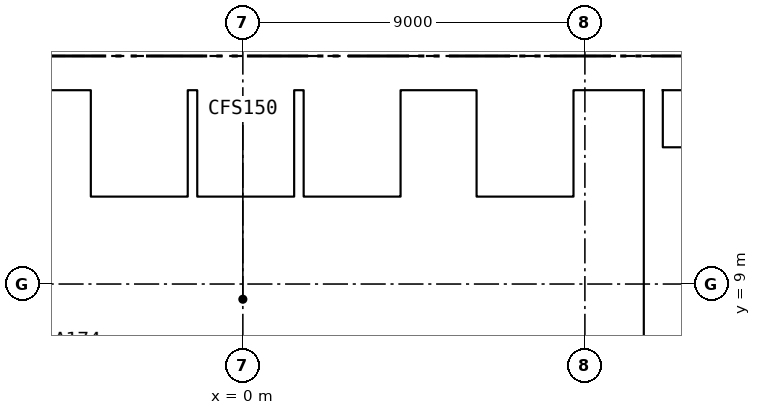
"""IFC4 building model, lengths in metres.
Left out: names, types, materials, properties, quantities, classifications, styles, units other than length and angle.
Written with IfcOpenShell. Run it as: python <this file> out.ifc"""

import sys

from ifc_helpers import new_model, si_unit, direction, frame, frame_2d, origin, place, context, subcontext, project, spatial, rectangle, extrude, element, fill, save


model = new_model("IFC4")
c1 = context("Model", 3, precision=1e-05, world=origin(), true_north=direction((0.0, 1.0)))
c2 = subcontext(c1, "Body", "Model", "MODEL_VIEW")
j1 = project(units=[si_unit("LENGTHUNIT", "METRE"), si_unit("PLANEANGLEUNIT", "RADIAN")], contexts=[c1])
p1 = place(None, origin())
s1 = spatial("IfcSite", under=j1, at=p1, CompositionType="ELEMENT")
p2 = place(p1, origin())
s2 = spatial("IfcBuilding", under=s1, at=p2, CompositionType="ELEMENT")
p3 = place(p2, frame((0.0, 0.0, 80.65)))
s3 = spatial("IfcBuildingStorey", under=s2, at=p3, CompositionType="ELEMENT", Elevation=80.65)
p4 = place(p3, frame((-15.0, 14.55, -0.15), z_axis=(0.0, 0.0, 1.0), x_axis=(1.0, 0.0, 0.0)))
e1 = element("IfcWall", 1, at=p4, inside=s3, PredefinedType="SOLIDWALL", context=c2, shape_type="SweptSolid", body=[
    extrude(rectangle(XDim=30.0, YDim=0.9, at=frame_2d((15.0, 0.0))), origin(), (0.0, 0.0, 1.0), 3.65),
])
p5 = place(p4, frame((9.25, 0.0, 0.15)))
e2 = element("IfcOpeningElement", 2, at=p5, cuts=e1, PredefinedType="OPENING", context=c2, shape_type="SweptSolid", body=[
    extrude(rectangle(XDim=1.5, YDim=2.1, at=frame_2d((0.75, 1.05))), frame((0.0, 0.46, 0.0), z_axis=(0.0, -1.0, 0.0), x_axis=(1.0, 0.0, 0.0)), (0.0, 0.0, 1.0), 0.92),
])
p6 = place(p4, frame((19.4, 0.0, 0.15)))
e3 = element("IfcOpeningElement", 3, at=p6, cuts=e1, PredefinedType="OPENING", context=c2, shape_type="SweptSolid", body=[
    extrude(rectangle(XDim=1.5, YDim=2.1, at=frame_2d((0.75, 1.05))), frame((0.0, 0.46, 0.0), z_axis=(0.0, -1.0, 0.0), x_axis=(1.0, 0.0, 0.0)), (0.0, 0.0, 1.0), 0.92),
])
p7 = place(p4, frame((1.5, 0.0, 0.15)))
e4 = element("IfcOpeningElement", 4, at=p7, cuts=e1, PredefinedType="OPENING", context=c2, shape_type="SweptSolid", body=[
    extrude(rectangle(XDim=1.2, YDim=2.1, at=frame_2d((0.6, 1.05))), frame((0.0, 0.46, 0.0), z_axis=(0.0, -1.0, 0.0), x_axis=(1.0, 0.0, 0.0)), (0.0, 0.0, 1.0), 0.92),
])
p8 = place(p4, frame((27.3, 0.0, 0.15)))
e5 = element("IfcOpeningElement", 5, at=p8, cuts=e1, PredefinedType="OPENING", context=c2, shape_type="SweptSolid", body=[
    extrude(rectangle(XDim=1.2, YDim=2.1, at=frame_2d((0.6, 1.05))), frame((0.0, 0.46, 0.0), z_axis=(0.0, -1.0, 0.0), x_axis=(1.0, 0.0, 0.0)), (0.0, 0.0, 1.0), 0.92),
])
p9 = place(p3, frame((10.8, 0.9, -0.15), z_axis=(0.0, 0.0, 1.0), x_axis=(0.0, 1.0, 0.0)))
e6 = element("IfcWall", 6, at=p9, inside=s3, PredefinedType="SOLIDWALL", context=c2, shape_type="SweptSolid", body=[
    extrude(rectangle(XDim=13.2, YDim=0.5, at=frame_2d((6.6, 0.0))), origin(), (0.0, 0.0, 1.0), 3.65),
])
p10 = place(p3, frame((-4.125, 8.55, 0.0), z_axis=(0.0, 0.0, 1.0), x_axis=(1.0, 0.0, 0.0)))
e7 = element("IfcWall", 7, at=p10, inside=s3, PredefinedType="PARTITIONING", context=c2, shape_type="SweptSolid", body=[
    extrude(rectangle(XDim=14.675, YDim=0.2, at=frame_2d((7.337, 0.0))), origin(), (0.0, 0.0, 1.0), 3.5),
])
p11 = place(p10, frame((1.413, 0.0, 0.0)))
e8 = element("IfcOpeningElement", 8, at=p11, cuts=e7, PredefinedType="OPENING", context=c2, shape_type="SweptSolid", body=[
    extrude(rectangle(XDim=1.0, YDim=2.1, at=frame_2d((0.5, 1.05))), frame((0.0, 0.11, 0.0), z_axis=(0.0, -1.0, 0.0), x_axis=(1.0, 0.0, 0.0)), (0.0, 0.0, 1.0), 0.22),
])
p12 = place(p10, frame((5.0, 0.0, 0.0)))
e9 = element("IfcOpeningElement", 9, at=p12, cuts=e7, PredefinedType="OPENING", context=c2, shape_type="SweptSolid", body=[
    extrude(rectangle(XDim=1.0, YDim=2.1, at=frame_2d((0.5, 1.05))), frame((0.0, 0.11, 0.0), z_axis=(0.0, -1.0, 0.0), x_axis=(1.0, 0.0, 0.0)), (0.0, 0.0, 1.0), 0.22),
])
p13 = place(p10, frame((9.613, 0.0, 0.0)))
e10 = element("IfcOpeningElement", 10, at=p13, cuts=e7, PredefinedType="OPENING", context=c2, shape_type="SweptSolid", body=[
    extrude(rectangle(XDim=1.0, YDim=2.1, at=frame_2d((0.5, 1.05))), frame((0.0, 0.11, 0.0), z_axis=(0.0, -1.0, 0.0), x_axis=(1.0, 0.0, 0.0)), (0.0, 0.0, 1.0), 0.22),
])
p14 = place(p10, frame((13.475, 0.0, 0.0)))
e11 = element("IfcOpeningElement", 11, at=p14, cuts=e7, PredefinedType="OPENING", context=c2, shape_type="SweptSolid", body=[
    extrude(rectangle(XDim=0.9, YDim=2.1, at=frame_2d((0.45, 1.05))), frame((0.0, 0.11, 0.0), z_axis=(0.0, -1.0, 0.0), x_axis=(1.0, 0.0, 0.0)), (0.0, 0.0, 1.0), 0.22),
])
p15 = place(p3, frame((-4.25, 11.2, 0.0), z_axis=(0.0, 0.0, 1.0), x_axis=(1.0, 0.0, 0.0)))
e12 = element("IfcWall", 12, at=p15, inside=s3, PredefinedType="PARTITIONING", context=c2, shape_type="SweptSolid", body=[
    extrude(rectangle(XDim=8.65, YDim=0.2, at=frame_2d((4.325, 0.0))), origin(), (0.0, 0.0, 1.0), 3.5),
])
p16 = place(p15, frame((0.825, 0.0, 0.0)))
e13 = element("IfcOpeningElement", 13, at=p16, cuts=e12, PredefinedType="OPENING", context=c2, shape_type="SweptSolid", body=[
    extrude(rectangle(XDim=1.4, YDim=2.1, at=frame_2d((0.7, 1.05))), frame((0.0, 0.11, 0.0), z_axis=(0.0, -1.0, 0.0), x_axis=(1.0, 0.0, 0.0)), (0.0, 0.0, 1.0), 0.22),
])
p17 = place(p15, frame((3.625, 0.0, 0.0)))
e14 = element("IfcOpeningElement", 14, at=p17, cuts=e12, PredefinedType="OPENING", context=c2, shape_type="SweptSolid", body=[
    extrude(rectangle(XDim=1.4, YDim=2.1, at=frame_2d((0.7, 1.05))), frame((0.0, 0.11, 0.0), z_axis=(0.0, -1.0, 0.0), x_axis=(1.0, 0.0, 0.0)), (0.0, 0.0, 1.0), 0.22),
])
p18 = place(p3, frame((5.9, 11.2, 0.0), z_axis=(0.0, 0.0, 1.0), x_axis=(1.0, 0.0, 0.0)))
e15 = element("IfcWall", 15, at=p18, inside=s3, PredefinedType="PARTITIONING", context=c2, shape_type="SweptSolid", body=[
    extrude(rectangle(XDim=4.65, YDim=0.2, at=frame_2d((2.325, 0.0))), origin(), (0.0, 0.0, 1.0), 3.5),
])
p19 = place(p18, frame((3.4, 0.0, 0.0)))
e16 = element("IfcOpeningElement", 16, at=p19, cuts=e15, PredefinedType="OPENING", context=c2, shape_type="SweptSolid", body=[
    extrude(rectangle(XDim=0.9, YDim=2.1, at=frame_2d((0.45, 1.05))), frame((0.0, 0.11, 0.0), z_axis=(0.0, -1.0, 0.0), x_axis=(1.0, 0.0, 0.0)), (0.0, 0.0, 1.0), 0.22),
])
p20 = place(p3, frame((-4.125, 6.15, 0.0), z_axis=(0.0, 0.0, 1.0), x_axis=(0.0, 1.0, 0.0)))
e17 = element("IfcWall", 17, at=p20, inside=s3, PredefinedType="PARTITIONING", context=c2, shape_type="SweptSolid", body=[
    extrude(rectangle(XDim=4.95, YDim=0.25, at=frame_2d((2.475, 0.0))), origin(), (0.0, 0.0, 1.0), 3.5),
])
p21 = place(p20, frame((3.125, 0.0, 0.0)))
e18 = element("IfcOpeningElement", 18, at=p21, cuts=e17, PredefinedType="OPENING", context=c2, shape_type="SweptSolid", body=[
    extrude(rectangle(XDim=1.2, YDim=2.1, at=frame_2d((0.6, 1.05))), frame((0.0, 0.135, 0.0), z_axis=(0.0, -1.0, 0.0), x_axis=(1.0, 0.0, 0.0)), (0.0, 0.0, 1.0), 0.27),
])
for number, where, z_axis, x_axis in (
    (19, (-0.35, 6.15, 0.0), (0.0, 0.0, 1.0), (0.0, 1.0, 0.0)),
    (20, (3.1, 6.15, 0.0), (0.0, 0.0, 1.0), (0.0, 1.0, 0.0)),
):
    element("IfcWall", number, at=place(p3, frame(where, z_axis=z_axis, x_axis=x_axis)), inside=s3, PredefinedType="PARTITIONING", context=c2, shape_type="SweptSolid", body=[
        extrude(rectangle(XDim=2.3, YDim=0.15, at=frame_2d((1.15, 0.0))), origin(), (0.0, 0.0, 1.0), 3.5),
    ])
p22 = place(p3, frame((8.925, 6.15, 0.0), z_axis=(0.0, 0.0, 1.0), x_axis=(0.0, 1.0, 0.0)))
e21 = element("IfcWall", 21, at=p22, inside=s3, PredefinedType="PARTITIONING", context=c2, shape_type="SweptSolid", body=[
    extrude(rectangle(XDim=2.3, YDim=0.25, at=frame_2d((1.15, 0.0))), origin(), (0.0, 0.0, 1.0), 3.5),
])
for number, where, z_axis, x_axis in (
    (22, (-4.125, 11.3, 0.0), (0.0, 0.0, 1.0), (0.0, 1.0, 0.0)),
    (23, (-1.325, 11.3, 0.0), (0.0, 0.0, 1.0), (0.0, 1.0, 0.0)),
    (24, (1.475, 11.3, 0.0), (0.0, 0.0, 1.0), (0.0, 1.0, 0.0)),
    (25, (4.275, 11.3, 0.0), (0.0, 0.0, 1.0), (0.0, 1.0, 0.0)),
    (26, (6.025, 11.3, 0.0), (0.0, 0.0, 1.0), (0.0, 1.0, 0.0)),
    (27, (8.825, 11.3, 0.0), (0.0, 0.0, 1.0), (0.0, 1.0, 0.0)),
):
    element("IfcWall", number, at=place(p3, frame(where, z_axis=z_axis, x_axis=x_axis)), inside=s3, PredefinedType="PARTITIONING", context=c2, shape_type="SweptSolid", body=[
        extrude(rectangle(XDim=2.8, YDim=0.25, at=frame_2d((1.4, 0.0))), origin(), (0.0, 0.0, 1.0), 3.5),
    ])
p23 = place(p21, origin())
e28 = element("IfcDoor", 28, at=p23, inside=s3, OperationType="SINGLE_SWING_LEFT", PredefinedType="DOOR", context=c2, shape_type="SweptSolid", body=[
    extrude(rectangle(XDim=1.2, YDim=2.1, at=frame_2d((0.6, 1.05))), frame((0.0, 0.025, 0.0), z_axis=(0.0, -1.0, 0.0), x_axis=(1.0, 0.0, 0.0)), (0.0, 0.0, 1.0), 0.05),
])
fill(e18, e28)
p24 = place(p11, origin())
e29 = element("IfcDoor", 29, at=p24, inside=s3, OperationType="SINGLE_SWING_LEFT", PredefinedType="DOOR", context=c2, shape_type="SweptSolid", body=[
    extrude(rectangle(XDim=1.0, YDim=2.1, at=frame_2d((0.5, 1.05))), frame((0.0, 0.025, 0.0), z_axis=(0.0, -1.0, 0.0), x_axis=(1.0, 0.0, 0.0)), (0.0, 0.0, 1.0), 0.05),
])
fill(e8, e29)
p25 = place(p12, origin())
e30 = element("IfcDoor", 30, at=p25, inside=s3, OperationType="SINGLE_SWING_RIGHT", PredefinedType="DOOR", context=c2, shape_type="SweptSolid", body=[
    extrude(rectangle(XDim=1.0, YDim=2.1, at=frame_2d((0.5, 1.05))), frame((0.0, 0.025, 0.0), z_axis=(0.0, -1.0, 0.0), x_axis=(1.0, 0.0, 0.0)), (0.0, 0.0, 1.0), 0.05),
])
fill(e9, e30)
p26 = place(p13, origin())
e31 = element("IfcDoor", 31, at=p26, inside=s3, OperationType="SINGLE_SWING_LEFT", PredefinedType="DOOR", context=c2, shape_type="SweptSolid", body=[
    extrude(rectangle(XDim=1.0, YDim=2.1, at=frame_2d((0.5, 1.05))), frame((0.0, 0.025, 0.0), z_axis=(0.0, -1.0, 0.0), x_axis=(1.0, 0.0, 0.0)), (0.0, 0.0, 1.0), 0.05),
])
fill(e10, e31)
p27 = place(p14, origin())
e32 = element("IfcDoor", 32, at=p27, inside=s3, OperationType="SINGLE_SWING_RIGHT", PredefinedType="DOOR", context=c2, shape_type="SweptSolid", body=[
    extrude(rectangle(XDim=0.9, YDim=2.1, at=frame_2d((0.45, 1.05))), frame((0.0, 0.025, 0.0), z_axis=(0.0, -1.0, 0.0), x_axis=(1.0, 0.0, 0.0)), (0.0, 0.0, 1.0), 0.05),
])
fill(e11, e32)
p28 = place(p16, origin())
e33 = element("IfcDoor", 33, at=p28, inside=s3, OperationType="DOUBLE_DOOR_SLIDING", PredefinedType="DOOR", context=c2, shape_type="SweptSolid", body=[
    extrude(rectangle(XDim=1.4, YDim=2.1, at=frame_2d((0.7, 1.05))), frame((0.0, 0.025, 0.0), z_axis=(0.0, -1.0, 0.0), x_axis=(1.0, 0.0, 0.0)), (0.0, 0.0, 1.0), 0.05),
])
fill(e13, e33)
p29 = place(p17, origin())
e34 = element("IfcDoor", 34, at=p29, inside=s3, OperationType="DOUBLE_DOOR_SLIDING", PredefinedType="DOOR", context=c2, shape_type="SweptSolid", body=[
    extrude(rectangle(XDim=1.4, YDim=2.1, at=frame_2d((0.7, 1.05))), frame((0.0, 0.025, 0.0), z_axis=(0.0, -1.0, 0.0), x_axis=(1.0, 0.0, 0.0)), (0.0, 0.0, 1.0), 0.05),
])
fill(e14, e34)
p30 = place(p19, origin())
e35 = element("IfcDoor", 35, at=p30, inside=s3, OperationType="SINGLE_SWING_LEFT", PredefinedType="DOOR", context=c2, shape_type="SweptSolid", body=[
    extrude(rectangle(XDim=0.9, YDim=2.1, at=frame_2d((0.45, 1.05))), frame((0.0, 0.025, 0.0), z_axis=(0.0, -1.0, 0.0), x_axis=(1.0, 0.0, 0.0)), (0.0, 0.0, 1.0), 0.05),
])
fill(e16, e35)
p31 = place(p5, origin())
e36 = element("IfcDoor", 36, at=p31, inside=s3, OperationType="DOUBLE_DOOR_SINGLE_SWING", PredefinedType="DOOR", context=c2, shape_type="SweptSolid", body=[
    extrude(rectangle(XDim=1.5, YDim=2.1, at=frame_2d((0.75, 1.05))), frame((0.0, 0.025, 0.0), z_axis=(0.0, -1.0, 0.0), x_axis=(1.0, 0.0, 0.0)), (0.0, 0.0, 1.0), 0.05),
])
fill(e2, e36)
p32 = place(p6, origin())
e37 = element("IfcDoor", 37, at=p32, inside=s3, OperationType="DOUBLE_DOOR_SINGLE_SWING", PredefinedType="DOOR", context=c2, shape_type="SweptSolid", body=[
    extrude(rectangle(XDim=1.5, YDim=2.1, at=frame_2d((0.75, 1.05))), frame((0.0, 0.025, 0.0), z_axis=(0.0, -1.0, 0.0), x_axis=(1.0, 0.0, 0.0)), (0.0, 0.0, 1.0), 0.05),
])
fill(e3, e37)
save(model, sys.argv[1])
